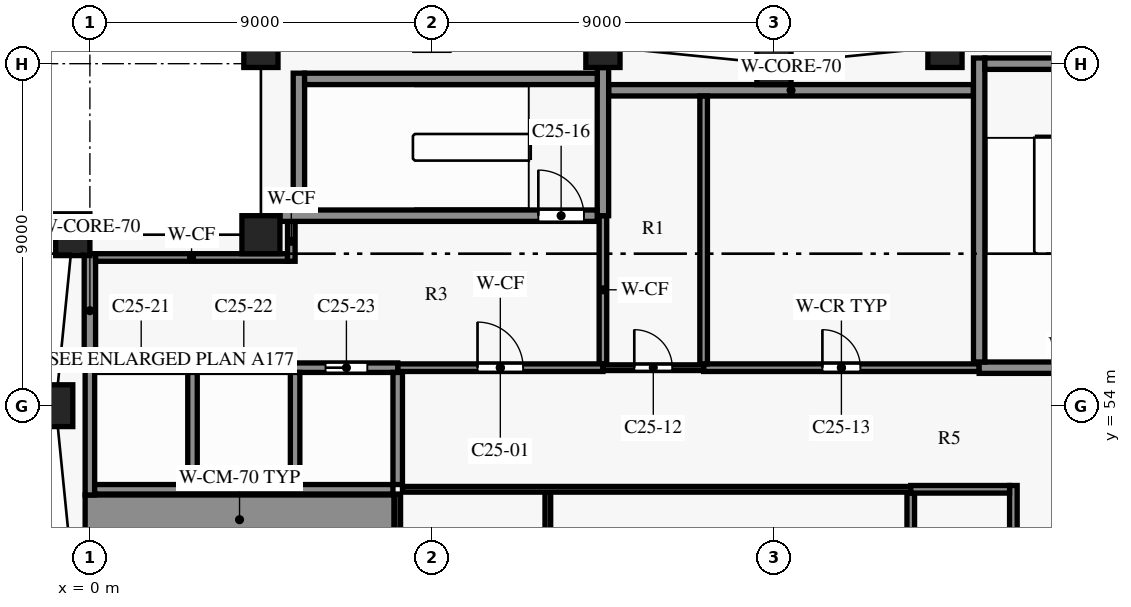
"""IFC4 building model, lengths in metres.
Left out: names, types, materials, properties, quantities, classifications, styles, units other than length and angle.
Written with IfcOpenShell. Run it as: python <this file> out.ifc"""

import sys

from ifc_helpers import new_model, si_unit, direction, frame, frame_2d, origin, origin_2d, place, context, subcontext, project, spatial, rectangle, extrude, element, fill, save


model = new_model("IFC4")
c1 = context("Model", 3, precision=1e-05, world=origin(), true_north=direction((0.0, 1.0)))
c2 = subcontext(c1, "Body", "Model", "MODEL_VIEW")
j1 = project(units=[si_unit("LENGTHUNIT", "METRE"), si_unit("PLANEANGLEUNIT", "RADIAN")], contexts=[c1])
p1 = place(None, origin())
s1 = spatial("IfcSite", under=j1, at=p1, CompositionType="ELEMENT")
p2 = place(p1, origin())
s2 = spatial("IfcBuilding", under=s1, at=p2, CompositionType="ELEMENT")
p3 = place(p2, frame((0.0, 0.0, 185.2)))
s3 = spatial("IfcBuildingStorey", under=s2, at=p3, CompositionType="ELEMENT", Elevation=185.2)
for number, where, z_axis, x_axis in (
    (1, (22.5, 63.45, 0.0), (0.0, 0.0, 1.0), (-0.995, -0.1, 0.0)),
    (2, (18.0, 63.0, 0.0), (0.0, 0.0, 1.0), (-1.0, 0.0, 0.0)),
    (3, (13.5, 63.45, 0.0), (0.0, 0.0, 1.0), (-0.995, 0.1, 0.0)),
    (4, (4.5, 63.45, 0.0), (0.0, 0.0, 1.0), (-0.995, -0.1, 0.0)),
    (5, (-0.45, 58.5, 0.0), (0.0, 0.0, 1.0), (-0.1, -0.995, 0.0)),
    (6, (-0.9, 54.0, 0.0), (0.0, 0.0, 1.0), (0.0, -1.0, 0.0)),
):
    element("IfcColumn", number, at=place(p3, frame(where, z_axis=z_axis, x_axis=x_axis)), inside=s3, PredefinedType="COLUMN", context=c2, shape_type="SweptSolid", body=[
        extrude(rectangle(XDim=0.9, YDim=1.1, at=origin_2d()), origin(), (0.0, 0.0, 1.0), 3.8),
    ])
p4 = place(p3, frame((4.5, 58.5, 0.0), z_axis=(0.0, 0.0, 1.0), x_axis=(1.0, 0.0, 0.0)))
e7 = element("IfcColumn", 7, at=p4, inside=s3, PredefinedType="COLUMN", context=c2, shape_type="SweptSolid", body=[
    extrude(rectangle(XDim=1.0, YDim=1.0, at=origin_2d()), origin(), (0.0, 0.0, 1.0), 3.8),
])
p5 = place(p3, frame((-0.125, 51.0, 0.0), z_axis=(0.0, 0.0, 1.0), x_axis=(1.0, 0.0, 0.0)))
e8 = element("IfcWall", 8, at=p5, inside=s3, PredefinedType="SHEAR", context=c2, shape_type="SweptSolid", body=[
    extrude(rectangle(XDim=8.125, YDim=1.3, at=frame_2d((4.062, 0.0))), origin(), (0.0, 0.0, 1.0), 3.5),
])
p6 = place(p3, frame((8.225, 51.8, 0.0), z_axis=(0.0, 0.0, 1.0), x_axis=(1.0, 0.0, 0.0)))
e9 = element("IfcWall", 9, at=p6, inside=s3, PredefinedType="PARTITIONING", context=c2, shape_type="SweptSolid", body=[
    extrude(rectangle(XDim=13.375, YDim=0.15, at=frame_2d((6.688, 0.0))), origin(), (0.0, 0.0, 1.0), 3.5),
])
p7 = place(p3, frame((21.6, 51.8, 0.0), z_axis=(0.0, 0.0, 1.0), x_axis=(1.0, 0.0, 0.0)))
e10 = element("IfcWall", 10, at=p7, inside=s3, PredefinedType="PARTITIONING", context=c2, shape_type="SweptSolid", body=[
    extrude(rectangle(XDim=2.6, YDim=0.2, at=frame_2d((1.3, 0.0))), origin(), (0.0, 0.0, 1.0), 3.5),
])
p8 = place(p3, frame((0.125, 51.8, 0.0), z_axis=(0.0, 0.0, 1.0), x_axis=(1.0, 0.0, 0.0)))
e11 = element("IfcWall", 11, at=p8, inside=s3, PredefinedType="SHEAR", context=c2, shape_type="SweptSolid", body=[
    extrude(rectangle(XDim=7.85, YDim=0.25, at=frame_2d((3.925, 0.0))), origin(), (0.0, 0.0, 1.0), 3.5),
])
p9 = place(p3, frame((8.1, 55.0, 0.0), z_axis=(0.0, 0.0, 1.0), x_axis=(1.0, 0.0, 0.0)))
e12 = element("IfcWall", 12, at=p9, inside=s3, PredefinedType="PARTITIONING", context=c2, shape_type="SweptSolid", body=[
    extrude(rectangle(XDim=5.4, YDim=0.2, at=frame_2d((2.7, 0.0))), origin(), (0.0, 0.0, 1.0), 3.5),
])
p10 = place(p9, frame((2.1, 0.0, 0.0)))
e13 = element("IfcOpeningElement", 13, at=p10, cuts=e12, PredefinedType="OPENING", context=c2, shape_type="SweptSolid", body=[
    extrude(rectangle(XDim=1.2, YDim=2.2, at=frame_2d((0.6, 1.1))), frame((0.0, 0.11, 0.0), z_axis=(0.0, -1.0, 0.0), x_axis=(1.0, 0.0, 0.0)), (0.0, 0.0, 1.0), 0.22),
])
p11 = place(p3, frame((13.5, 55.0, 0.0), z_axis=(0.0, 0.0, 1.0), x_axis=(1.0, 0.0, 0.0)))
e14 = element("IfcWall", 14, at=p11, inside=s3, PredefinedType="PARTITIONING", context=c2, shape_type="SweptSolid", body=[
    extrude(rectangle(XDim=2.65, YDim=0.15, at=frame_2d((1.325, 0.0))), origin(), (0.0, 0.0, 1.0), 3.5),
])
p12 = place(p11, frame((0.825, 0.0, 0.0)))
e15 = element("IfcOpeningElement", 15, at=p12, cuts=e14, PredefinedType="OPENING", context=c2, shape_type="SweptSolid", body=[
    extrude(rectangle(XDim=1.0, YDim=2.1, at=frame_2d((0.5, 1.05))), frame((0.0, 0.085, 0.0), z_axis=(0.0, -1.0, 0.0), x_axis=(1.0, 0.0, 0.0)), (0.0, 0.0, 1.0), 0.17),
])
p13 = place(p3, frame((16.15, 55.0, 0.0), z_axis=(0.0, 0.0, 1.0), x_axis=(1.0, 0.0, 0.0)))
e16 = element("IfcWall", 16, at=p13, inside=s3, PredefinedType="PARTITIONING", context=c2, shape_type="SweptSolid", body=[
    extrude(rectangle(XDim=7.25, YDim=0.2, at=frame_2d((3.625, 0.0))), origin(), (0.0, 0.0, 1.0), 3.5),
])
p14 = place(p13, frame((3.125, 0.0, 0.0)))
e17 = element("IfcOpeningElement", 17, at=p14, cuts=e16, PredefinedType="OPENING", context=c2, shape_type="SweptSolid", body=[
    extrude(rectangle(XDim=1.0, YDim=2.1, at=frame_2d((0.5, 1.05))), frame((0.0, 0.11, 0.0), z_axis=(0.0, -1.0, 0.0), x_axis=(1.0, 0.0, 0.0)), (0.0, 0.0, 1.0), 0.22),
])
p15 = place(p3, frame((0.15, 55.0, 0.0), z_axis=(0.0, 0.0, 1.0), x_axis=(1.0, 0.0, 0.0)))
e18 = element("IfcWall", 18, at=p15, inside=s3, PredefinedType="SHEAR", context=c2, shape_type="SweptSolid", body=[
    extrude(rectangle(XDim=7.95, YDim=0.25, at=frame_2d((3.975, 0.0))), origin(), (0.0, 0.0, 1.0), 3.5),
])
p16 = place(p15, frame((0.65, 0.0, 0.0)))
e19 = element("IfcOpeningElement", 19, at=p16, cuts=e18, PredefinedType="OPENING", context=c2, shape_type="SweptSolid", body=[
    extrude(rectangle(XDim=1.1, YDim=2.1, at=frame_2d((0.55, 1.05))), frame((0.0, 0.135, 0.0), z_axis=(0.0, -1.0, 0.0), x_axis=(1.0, 0.0, 0.0)), (0.0, 0.0, 1.0), 0.27),
])
p17 = place(p15, frame((3.35, 0.0, 0.0)))
e20 = element("IfcOpeningElement", 20, at=p17, cuts=e18, PredefinedType="OPENING", context=c2, shape_type="SweptSolid", body=[
    extrude(rectangle(XDim=1.1, YDim=2.1, at=frame_2d((0.55, 1.05))), frame((0.0, 0.135, 0.0), z_axis=(0.0, -1.0, 0.0), x_axis=(1.0, 0.0, 0.0)), (0.0, 0.0, 1.0), 0.27),
])
p18 = place(p15, frame((6.05, 0.0, 0.0)))
e21 = element("IfcOpeningElement", 21, at=p18, cuts=e18, PredefinedType="OPENING", context=c2, shape_type="SweptSolid", body=[
    extrude(rectangle(XDim=1.1, YDim=2.1, at=frame_2d((0.55, 1.05))), frame((0.0, 0.135, 0.0), z_axis=(0.0, -1.0, 0.0), x_axis=(1.0, 0.0, 0.0)), (0.0, 0.0, 1.0), 0.27),
])
p19 = place(p3, frame((23.4, 55.0, 0.0), z_axis=(0.0, 0.0, 1.0), x_axis=(1.0, 0.0, 0.0)))
e22 = element("IfcWall", 22, at=p19, inside=s3, PredefinedType="SHEAR", context=c2, shape_type="SweptSolid", body=[
    extrude(rectangle(XDim=3.45, YDim=0.3, at=frame_2d((1.725, 0.0))), origin(), (0.0, 0.0, 1.0), 3.5),
])
p20 = place(p3, frame((0.15, 57.9, 0.0), z_axis=(0.0, 0.0, 1.0), x_axis=(1.0, 0.0, 0.0)))
e23 = element("IfcWall", 23, at=p20, inside=s3, PredefinedType="PARTITIONING", context=c2, shape_type="SweptSolid", body=[
    extrude(rectangle(XDim=5.05, YDim=0.2, at=frame_2d((2.525, 0.0))), origin(), (0.0, 0.0, 1.0), 3.5),
])
p21 = place(p3, frame((5.0, 59.0, 0.0), z_axis=(0.0, 0.0, 1.0), x_axis=(1.0, 0.0, 0.0)))
e24 = element("IfcWall", 24, at=p21, inside=s3, PredefinedType="SHEAR", context=c2, shape_type="SweptSolid", body=[
    extrude(rectangle(XDim=8.35, YDim=0.3, at=frame_2d((4.175, 0.0))), origin(), (0.0, 0.0, 1.0), 3.5),
])
p22 = place(p21, frame((6.8, 0.0, 0.0)))
e25 = element("IfcOpeningElement", 25, at=p22, cuts=e24, PredefinedType="OPENING", context=c2, shape_type="SweptSolid", body=[
    extrude(rectangle(XDim=1.2, YDim=2.2, at=frame_2d((0.6, 1.1))), frame((0.0, 0.16, 0.0), z_axis=(0.0, -1.0, 0.0), x_axis=(1.0, 0.0, 0.0)), (0.0, 0.0, 1.0), 0.32),
])
p23 = place(p3, frame((13.65, 62.3, 0.0), z_axis=(0.0, 0.0, 1.0), x_axis=(1.0, 0.0, 0.0)))
e26 = element("IfcWall", 26, at=p23, inside=s3, PredefinedType="SHEAR", context=c2, shape_type="SweptSolid", body=[
    extrude(rectangle(XDim=9.6, YDim=0.3, at=frame_2d((4.8, 0.0))), origin(), (0.0, 0.0, 1.0), 3.5),
])
p24 = place(p3, frame((5.65, 62.6, 0.0), z_axis=(0.0, 0.0, 1.0), x_axis=(1.0, 0.0, 0.0)))
e27 = element("IfcWall", 27, at=p24, inside=s3, PredefinedType="SHEAR", context=c2, shape_type="SweptSolid", body=[
    extrude(rectangle(XDim=7.7, YDim=0.3, at=frame_2d((3.85, 0.0))), origin(), (0.0, 0.0, 1.0), 3.5),
])
p25 = place(p3, frame((23.55, 63.0, 0.0), z_axis=(0.0, 0.0, 1.0), x_axis=(1.0, 0.0, 0.0)))
e28 = element("IfcWall", 28, at=p25, inside=s3, PredefinedType="SHEAR", context=c2, shape_type="SweptSolid", body=[
    extrude(rectangle(XDim=3.3, YDim=0.3, at=frame_2d((1.65, 0.0))), origin(), (0.0, 0.0, 1.0), 3.5),
])
p26 = place(p3, frame((0.0, 55.0, 0.0), z_axis=(0.0, 0.0, 1.0), x_axis=(0.0, 1.0, 0.0)))
e29 = element("IfcWall", 29, at=p26, inside=s3, PredefinedType="SHEAR", context=c2, shape_type="SweptSolid", body=[
    extrude(rectangle(XDim=3.0, YDim=0.3, at=frame_2d((1.5, 0.0))), origin(), (0.0, 0.0, 1.0), 3.5),
])
p27 = place(p3, frame((0.0, 51.65, 0.0), z_axis=(0.0, 0.0, 1.0), x_axis=(0.0, 1.0, 0.0)))
e30 = element("IfcWall", 30, at=p27, inside=s3, PredefinedType="SHEAR", context=c2, shape_type="SweptSolid", body=[
    extrude(rectangle(XDim=3.35, YDim=0.25, at=frame_2d((1.675, 0.0))), origin(), (0.0, 0.0, 1.0), 3.5),
])
p28 = place(p3, frame((2.7, 51.925, 0.0), z_axis=(0.0, 0.0, 1.0), x_axis=(0.0, 1.0, 0.0)))
e31 = element("IfcWall", 31, at=p28, inside=s3, PredefinedType="SHEAR", context=c2, shape_type="SweptSolid", body=[
    extrude(rectangle(XDim=2.95, YDim=0.25, at=frame_2d((1.475, 0.0))), origin(), (0.0, 0.0, 1.0), 3.5),
])
p29 = place(p3, frame((5.3, 57.8, 0.0), z_axis=(0.0, 0.0, 1.0), x_axis=(0.0, 1.0, 0.0)))
e32 = element("IfcWall", 32, at=p29, inside=s3, PredefinedType="PARTITIONING", context=c2, shape_type="SweptSolid", body=[
    extrude(rectangle(XDim=1.05, YDim=0.2, at=frame_2d((0.525, 0.0))), origin(), (0.0, 0.0, 1.0), 3.5),
])
p30 = place(p3, frame((5.4, 51.925, 0.0), z_axis=(0.0, 0.0, 1.0), x_axis=(0.0, 1.0, 0.0)))
e33 = element("IfcWall", 33, at=p30, inside=s3, PredefinedType="SHEAR", context=c2, shape_type="SweptSolid", body=[
    extrude(rectangle(XDim=2.95, YDim=0.25, at=frame_2d((1.475, 0.0))), origin(), (0.0, 0.0, 1.0), 3.5),
])
p31 = place(p3, frame((5.5, 59.15, 0.0), z_axis=(0.0, 0.0, 1.0), x_axis=(0.0, 1.0, 0.0)))
e34 = element("IfcWall", 34, at=p31, inside=s3, PredefinedType="SHEAR", context=c2, shape_type="SweptSolid", body=[
    extrude(rectangle(XDim=3.6, YDim=0.3, at=frame_2d((1.8, 0.0))), origin(), (0.0, 0.0, 1.0), 3.5),
])
p32 = place(p3, frame((8.1, 50.2, 0.0), z_axis=(0.0, 0.0, 1.0), x_axis=(0.0, 1.0, 0.0)))
e35 = element("IfcWall", 35, at=p32, inside=s3, PredefinedType="PARTITIONING", context=c2, shape_type="SweptSolid", body=[
    extrude(rectangle(XDim=1.475, YDim=0.15, at=frame_2d((0.738, 0.0))), origin(), (0.0, 0.0, 1.0), 3.5),
])
p33 = place(p3, frame((8.1, 51.925, 0.0), z_axis=(0.0, 0.0, 1.0), x_axis=(0.0, 1.0, 0.0)))
e36 = element("IfcWall", 36, at=p33, inside=s3, PredefinedType="SHEAR", context=c2, shape_type="SweptSolid", body=[
    extrude(rectangle(XDim=2.95, YDim=0.25, at=frame_2d((1.475, 0.0))), origin(), (0.0, 0.0, 1.0), 3.5),
])
p34 = place(p3, frame((12.05, 47.075, 0.0), z_axis=(0.0, 0.0, 1.0), x_axis=(0.0, 1.0, 0.0)))
e37 = element("IfcWall", 37, at=p34, inside=s3, PredefinedType="PARTITIONING", context=c2, shape_type="SweptSolid", body=[
    extrude(rectangle(XDim=4.65, YDim=0.15, at=frame_2d((2.325, 0.0))), origin(), (0.0, 0.0, 1.0), 3.5),
])
p35 = place(p3, frame((13.5, 55.1, 0.0), z_axis=(0.0, 0.0, 1.0), x_axis=(0.0, 1.0, 0.0)))
e38 = element("IfcWall", 38, at=p35, inside=s3, PredefinedType="PARTITIONING", context=c2, shape_type="SweptSolid", body=[
    extrude(rectangle(XDim=3.9, YDim=0.2, at=frame_2d((1.95, 0.0))), origin(), (0.0, 0.0, 1.0), 3.5),
])
p36 = place(p3, frame((13.5, 59.0, 0.0), z_axis=(0.0, 0.0, 1.0), x_axis=(0.0, 1.0, 0.0)))
e39 = element("IfcWall", 39, at=p36, inside=s3, PredefinedType="SHEAR", context=c2, shape_type="SweptSolid", body=[
    extrude(rectangle(XDim=3.897, YDim=0.3, at=frame_2d((1.949, 0.0))), origin(), (0.0, 0.0, 1.0), 3.5),
])
p37 = place(p3, frame((16.15, 55.1, 0.0), z_axis=(0.0, 0.0, 1.0), x_axis=(0.0, 1.0, 0.0)))
e40 = element("IfcWall", 40, at=p37, inside=s3, PredefinedType="PARTITIONING", context=c2, shape_type="SweptSolid", body=[
    extrude(rectangle(XDim=7.05, YDim=0.2, at=frame_2d((3.525, 0.0))), origin(), (0.0, 0.0, 1.0), 3.5),
])
p38 = place(p3, frame((21.6, 47.1, 0.0), z_axis=(0.0, 0.0, 1.0), x_axis=(0.0, 1.0, 0.0)))
e41 = element("IfcWall", 41, at=p38, inside=s3, PredefinedType="PARTITIONING", context=c2, shape_type="SweptSolid", body=[
    extrude(rectangle(XDim=4.6, YDim=0.2, at=frame_2d((2.3, 0.0))), origin(), (0.0, 0.0, 1.0), 3.5),
])
p39 = place(p3, frame((23.4, 55.15, 0.0), z_axis=(0.0, 0.0, 1.0), x_axis=(0.0, 1.0, 0.0)))
e42 = element("IfcWall", 42, at=p39, inside=s3, PredefinedType="SHEAR", context=c2, shape_type="SweptSolid", body=[
    extrude(rectangle(XDim=8.0, YDim=0.3, at=frame_2d((4.0, 0.0))), origin(), (0.0, 0.0, 1.0), 3.5),
])
p40 = place(p3, frame((24.3, 46.9, 0.0), z_axis=(0.0, 0.0, 1.0), x_axis=(0.0, 1.0, 0.0)))
e43 = element("IfcWall", 43, at=p40, inside=s3, PredefinedType="SHEAR", context=c2, shape_type="SweptSolid", body=[
    extrude(rectangle(XDim=5.0, YDim=0.2, at=frame_2d((2.5, 0.0))), origin(), (0.0, 0.0, 1.0), 3.5),
])
p41 = place(p10, origin())
e44 = element("IfcDoor", 44, at=p41, inside=s3, OperationType="SINGLE_SWING_RIGHT", PredefinedType="DOOR", context=c2, shape_type="SweptSolid", body=[
    extrude(rectangle(XDim=1.2, YDim=2.2, at=frame_2d((0.6, 1.1))), frame((0.0, 0.025, 0.0), z_axis=(0.0, -1.0, 0.0), x_axis=(1.0, 0.0, 0.0)), (0.0, 0.0, 1.0), 0.05),
])
fill(e13, e44)
p42 = place(p12, origin())
e45 = element("IfcDoor", 45, at=p42, inside=s3, OperationType="SINGLE_SWING_LEFT", PredefinedType="DOOR", context=c2, shape_type="SweptSolid", body=[
    extrude(rectangle(XDim=1.0, YDim=2.1, at=frame_2d((0.5, 1.05))), frame((0.0, 0.025, 0.0), z_axis=(0.0, -1.0, 0.0), x_axis=(1.0, 0.0, 0.0)), (0.0, 0.0, 1.0), 0.05),
])
fill(e15, e45)
p43 = place(p14, origin())
e46 = element("IfcDoor", 46, at=p43, inside=s3, OperationType="SINGLE_SWING_RIGHT", PredefinedType="DOOR", context=c2, shape_type="SweptSolid", body=[
    extrude(rectangle(XDim=1.0, YDim=2.1, at=frame_2d((0.5, 1.05))), frame((0.0, 0.025, 0.0), z_axis=(0.0, -1.0, 0.0), x_axis=(1.0, 0.0, 0.0)), (0.0, 0.0, 1.0), 0.05),
])
fill(e17, e46)
p44 = place(p22, origin())
e47 = element("IfcDoor", 47, at=p44, inside=s3, OperationType="SINGLE_SWING_RIGHT", PredefinedType="DOOR", context=c2, shape_type="SweptSolid", body=[
    extrude(rectangle(XDim=1.2, YDim=2.2, at=frame_2d((0.6, 1.1))), frame((0.0, 0.025, 0.0), z_axis=(0.0, -1.0, 0.0), x_axis=(1.0, 0.0, 0.0)), (0.0, 0.0, 1.0), 0.05),
])
fill(e25, e47)
p45 = place(p16, origin())
e48 = element("IfcDoor", 48, at=p45, inside=s3, OperationType="DOUBLE_DOOR_SLIDING", PredefinedType="DOOR", context=c2, shape_type="SweptSolid", body=[
    extrude(rectangle(XDim=1.1, YDim=2.1, at=frame_2d((0.55, 1.05))), frame((0.0, 0.025, 0.0), z_axis=(0.0, -1.0, 0.0), x_axis=(1.0, 0.0, 0.0)), (0.0, 0.0, 1.0), 0.05),
])
fill(e19, e48)
p46 = place(p17, origin())
e49 = element("IfcDoor", 49, at=p46, inside=s3, OperationType="DOUBLE_DOOR_SLIDING", PredefinedType="DOOR", context=c2, shape_type="SweptSolid", body=[
    extrude(rectangle(XDim=1.1, YDim=2.1, at=frame_2d((0.55, 1.05))), frame((0.0, 0.025, 0.0), z_axis=(0.0, -1.0, 0.0), x_axis=(1.0, 0.0, 0.0)), (0.0, 0.0, 1.0), 0.05),
])
fill(e20, e49)
p47 = place(p18, origin())
e50 = element("IfcDoor", 50, at=p47, inside=s3, OperationType="DOUBLE_DOOR_SLIDING", PredefinedType="DOOR", context=c2, shape_type="SweptSolid", body=[
    extrude(rectangle(XDim=1.1, YDim=2.1, at=frame_2d((0.55, 1.05))), frame((0.0, 0.025, 0.0), z_axis=(0.0, -1.0, 0.0), x_axis=(1.0, 0.0, 0.0)), (0.0, 0.0, 1.0), 0.05),
])
fill(e21, e50)
save(model, sys.argv[1])
